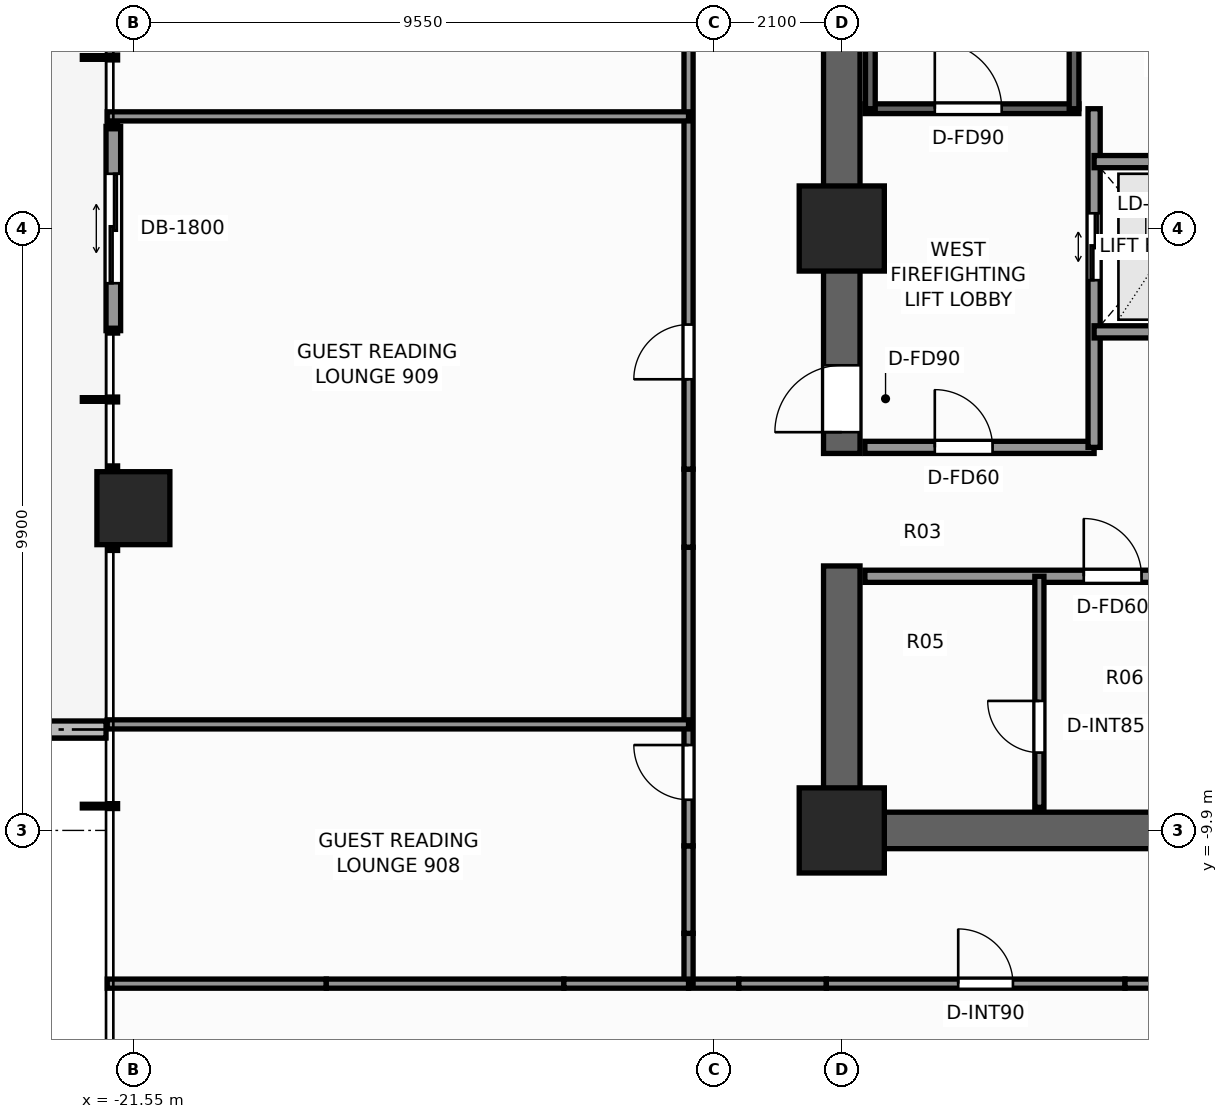
"""IFC4 building model, lengths in metres.
Left out: names, types, materials, properties, quantities, classifications, styles, units other than length and angle.
Written with IfcOpenShell. Run it as: python <this file> out.ifc"""

import sys

from ifc_helpers import new_model, si_unit, direction, frame, frame_2d, origin, origin_2d, place, context, subcontext, project, spatial, rectangle, extrude, element, fill, save


model = new_model("IFC4")
c1 = context("Model", 3, precision=1e-05, world=origin(), true_north=direction((0.0, 1.0)))
c2 = subcontext(c1, "Body", "Model", "MODEL_VIEW")
j1 = project(units=[si_unit("LENGTHUNIT", "METRE"), si_unit("PLANEANGLEUNIT", "RADIAN")], contexts=[c1])
p1 = place(None, origin())
s1 = spatial("IfcSite", under=j1, at=p1, CompositionType="ELEMENT")
p2 = place(p1, origin())
s2 = spatial("IfcBuilding", under=s1, at=p2, CompositionType="ELEMENT")
p3 = place(p2, frame((0.0, 0.0, 33.7)))
s3 = spatial("IfcBuildingStorey", under=s2, at=p3, CompositionType="ELEMENT", Elevation=33.7)
p4 = place(p3, frame((-3.54, -9.9, 0.0), z_axis=(0.0, 0.0, 1.0), x_axis=(-1.0, 0.0, 0.0)))
e1 = element("IfcWall", 1, at=p4, inside=s3, PredefinedType="SHEAR", context=c2, shape_type="SweptSolid", body=[
    extrude(rectangle(XDim=6.66, YDim=0.6, at=frame_2d((3.33, 0.0))), origin(), (0.0, 0.0, 1.0), 3.3),
])
p5 = place(p3, frame((-9.9, -9.6, 0.0), z_axis=(0.0, 0.0, 1.0), x_axis=(0.0, 1.0, 0.0)))
e2 = element("IfcWall", 2, at=p5, inside=s3, PredefinedType="SHEAR", context=c2, shape_type="SweptSolid", body=[
    extrude(rectangle(XDim=4.05, YDim=0.6, at=frame_2d((2.025, 0.0))), origin(), (0.0, 0.0, 1.0), 3.3),
])
p6 = place(p3, frame((-9.9, -3.7, 0.0), z_axis=(0.0, 0.0, 1.0), x_axis=(0.0, 1.0, 0.0)))
e3 = element("IfcWall", 3, at=p6, inside=s3, PredefinedType="SHEAR", context=c2, shape_type="SweptSolid", body=[
    extrude(rectangle(XDim=13.3, YDim=0.6, at=frame_2d((6.65, 0.0))), origin(), (0.0, 0.0, 1.0), 3.3),
])
p7 = place(p6, frame((0.35, 0.0, 0.0)))
e4 = element("IfcOpeningElement", 4, at=p7, cuts=e3, PredefinedType="OPENING", context=c2, shape_type="SweptSolid", body=[
    extrude(rectangle(XDim=1.1, YDim=2.2, at=frame_2d((0.55, 1.1))), frame((0.0, 0.31, 0.0), z_axis=(0.0, -1.0, 0.0), x_axis=(1.0, 0.0, 0.0)), (0.0, 0.0, 1.0), 0.62),
])
for number, where, z_axis, x_axis in (
    (5, (-9.9, -9.9, 0.0), (0.0, 0.0, 1.0), (1.0, 0.0, 0.0)),
    (6, (-9.9, 0.0, 0.0), (0.0, 0.0, 1.0), (1.0, 0.0, 0.0)),
):
    element("IfcColumn", number, at=place(p3, frame(where, z_axis=z_axis, x_axis=x_axis)), inside=s3, PredefinedType="COLUMN", context=c2, shape_type="SweptSolid", body=[
        extrude(rectangle(XDim=1.4, YDim=1.4, at=origin_2d()), origin(), (0.0, 0.0, 1.0), 3.3),
    ])
p8 = place(p3, frame((-21.55, -4.6, 0.0), z_axis=(0.0, 0.0, 1.0), x_axis=(1.0, 0.0, 0.0)))
e7 = element("IfcColumn", 7, at=p8, inside=s3, PredefinedType="COLUMN", context=c2, shape_type="SweptSolid", body=[
    extrude(rectangle(XDim=1.2, YDim=1.2, at=origin_2d()), origin(), (0.0, 0.0, 1.0), 3.3),
])
p9 = place(p3, frame((-24.006, -8.24, -0.06), z_axis=(0.0, 0.0, 1.0), x_axis=(1.0, 0.0, 0.0)))
e8 = element("IfcWall", 8, at=p9, inside=s3, PredefinedType="PARAPET", context=c2, shape_type="SweptSolid", body=[
    extrude(rectangle(XDim=2.006, YDim=0.28, at=frame_2d((1.003, 0.0))), origin(), (0.0, 0.0, 1.0), 0.42),
])
p10 = place(p3, frame((-21.88, -1.68, 0.0), z_axis=(0.0, 0.0, 1.0), x_axis=(0.0, 1.0, 0.0)))
e9 = element("IfcWall", 9, at=p10, inside=s3, PredefinedType="STANDARD", context=c2, shape_type="SweptSolid", body=[
    extrude(rectangle(XDim=3.36, YDim=0.24, at=frame_2d((1.68, 0.0))), origin(), (0.0, 0.0, 1.0), 3.06),
])
p11 = place(p10, frame((0.78, 0.0, 0.0)))
e10 = element("IfcOpeningElement", 10, at=p11, cuts=e9, PredefinedType="OPENING", context=c2, shape_type="SweptSolid", body=[
    extrude(rectangle(XDim=1.8, YDim=2.2, at=frame_2d((0.9, 1.1))), frame((0.0, 0.13, 0.0), z_axis=(0.0, -1.0, 0.0), x_axis=(1.0, 0.0, 0.0)), (0.0, 0.0, 1.0), 0.26),
])
p12 = place(p3, frame((-9.52, 1.97, 0.0), z_axis=(0.0, 0.0, 1.0), x_axis=(1.0, 0.0, 0.0)))
e11 = element("IfcWall", 11, at=p12, inside=s3, PredefinedType="SHEAR", context=c2, shape_type="SweptSolid", body=[
    extrude(rectangle(XDim=3.52, YDim=0.16, at=frame_2d((1.76, 0.0))), origin(), (0.0, 0.0, 1.0), 3.3),
])
p13 = place(p12, frame((1.15, 0.0, 0.0)))
e12 = element("IfcOpeningElement", 12, at=p13, cuts=e11, PredefinedType="OPENING", context=c2, shape_type="SweptSolid", body=[
    extrude(rectangle(XDim=1.1, YDim=2.2, at=frame_2d((0.55, 1.1))), frame((0.0, 0.09, 0.0), z_axis=(0.0, -1.0, 0.0), x_axis=(1.0, 0.0, 0.0)), (0.0, 0.0, 1.0), 0.18),
])
for number, where, z_axis, x_axis in (
    (13, (-9.43, 1.97, 0.0), (0.0, 0.0, 1.0), (0.0, 1.0, 0.0)),
    (14, (-6.08, 1.97, 0.0), (0.0, 0.0, 1.0), (0.0, 1.0, 0.0)),
):
    element("IfcWall", number, at=place(p3, frame(where, z_axis=z_axis, x_axis=x_axis)), inside=s3, PredefinedType="SHEAR", context=c2, shape_type="SweptSolid", body=[
        extrude(rectangle(XDim=7.56, YDim=0.16, at=frame_2d((3.78, 0.0))), origin(), (0.0, 0.0, 1.0), 3.3),
    ])
p14 = place(p3, frame((-9.52, -3.6, 0.0), z_axis=(0.0, 0.0, 1.0), x_axis=(1.0, 0.0, 0.0)))
e15 = element("IfcWall", 15, at=p14, inside=s3, PredefinedType="SOLIDWALL", context=c2, shape_type="SweptSolid", body=[
    extrude(rectangle(XDim=3.77, YDim=0.2, at=frame_2d((1.885, 0.0))), origin(), (0.0, 0.0, 1.0), 3.06),
])
p15 = place(p14, frame((1.15, 0.0, 0.0)))
e16 = element("IfcOpeningElement", 16, at=p15, cuts=e15, PredefinedType="OPENING", context=c2, shape_type="SweptSolid", body=[
    extrude(rectangle(XDim=0.95, YDim=2.06, at=frame_2d((0.475, 1.03))), frame((0.0, 0.11, 0.0), z_axis=(0.0, -1.0, 0.0), x_axis=(1.0, 0.0, 0.0)), (0.0, 0.0, 1.0), 0.22),
])
p16 = place(p3, frame((-5.75, -3.6, 0.0), z_axis=(0.0, 0.0, 1.0), x_axis=(0.0, 1.0, 0.0)))
e17 = element("IfcWall", 17, at=p16, inside=s3, PredefinedType="SOLIDWALL", context=c2, shape_type="SweptSolid", body=[
    extrude(rectangle(XDim=5.57, YDim=0.2, at=frame_2d((2.785, 0.0))), origin(), (0.0, 0.0, 1.0), 3.06),
])
p17 = place(p16, frame((2.75, 0.0, 0.0)))
e18 = element("IfcOpeningElement", 18, at=p17, cuts=e17, PredefinedType="OPENING", context=c2, shape_type="SweptSolid", body=[
    extrude(rectangle(XDim=1.1, YDim=2.2, at=frame_2d((0.55, 1.1))), frame((0.0, 0.11, 0.0), z_axis=(0.0, -1.0, 0.0), x_axis=(1.0, 0.0, 0.0)), (0.0, 0.0, 1.0), 0.22),
])
for number, where, z_axis, x_axis in (
    (19, (-5.75, -1.7, 0.0), (0.0, 0.0, 1.0), (1.0, 0.0, 0.0)),
    (20, (-5.75, 1.1, 0.0), (0.0, 0.0, 1.0), (1.0, 0.0, 0.0)),
):
    element("IfcWall", number, at=place(p3, frame(where, z_axis=z_axis, x_axis=x_axis)), inside=s3, PredefinedType="SOLIDWALL", context=c2, shape_type="SweptSolid", body=[
        extrude(rectangle(XDim=2.4, YDim=0.2, at=frame_2d((1.2, 0.0))), origin(), (0.0, 0.0, 1.0), 3.06),
    ])
p18 = place(p3, frame((-9.52, -5.72, 0.0), z_axis=(0.0, 0.0, 1.0), x_axis=(1.0, 0.0, 0.0)))
e21 = element("IfcWall", 21, at=p18, inside=s3, PredefinedType="SOLIDWALL", context=c2, shape_type="SweptSolid", body=[
    extrude(rectangle(XDim=5.66, YDim=0.2, at=frame_2d((2.83, 0.0))), origin(), (0.0, 0.0, 1.0), 3.06),
])
p19 = place(p18, frame((3.6, 0.0, 0.0)))
e22 = element("IfcOpeningElement", 22, at=p19, cuts=e21, PredefinedType="OPENING", context=c2, shape_type="SweptSolid", body=[
    extrude(rectangle(XDim=0.95, YDim=2.06, at=frame_2d((0.475, 1.03))), frame((0.0, 0.11, 0.0), z_axis=(0.0, -1.0, 0.0), x_axis=(1.0, 0.0, 0.0)), (0.0, 0.0, 1.0), 0.22),
])
p20 = place(p3, frame((-6.65, -9.52, 0.0), z_axis=(0.0, 0.0, 1.0), x_axis=(0.0, 1.0, 0.0)))
e23 = element("IfcWall", 23, at=p20, inside=s3, PredefinedType="PARTITIONING", context=c2, shape_type="SweptSolid", body=[
    extrude(rectangle(XDim=3.8, YDim=0.15, at=frame_2d((1.9, 0.0))), origin(), (0.0, 0.0, 1.0), 3.06),
])
p21 = place(p20, frame((0.9, 0.0, 0.0)))
e24 = element("IfcOpeningElement", 24, at=p21, cuts=e23, PredefinedType="OPENING", context=c2, shape_type="SweptSolid", body=[
    extrude(rectangle(XDim=0.85, YDim=2.03, at=frame_2d((0.425, 1.015))), frame((0.0, 0.085, 0.0), z_axis=(0.0, -1.0, 0.0), x_axis=(1.0, 0.0, 0.0)), (0.0, 0.0, 1.0), 0.17),
])
p22 = place(p3, frame((-12.42, -12.42, 0.0), z_axis=(0.0, 0.0, 1.0), x_axis=(1.0, 0.0, 0.0)))
e25 = element("IfcWall", 25, at=p22, inside=s3, PredefinedType="PARTITIONING", context=c2, shape_type="SweptSolid", body=[
    extrude(rectangle(XDim=0.827, YDim=0.15, at=frame_2d((0.414, 0.0))), origin(), (0.0, 0.0, 1.0), 3.06),
])
p23 = place(p3, frame((-11.593, -12.42, 0.0), z_axis=(0.0, 0.0, 1.0), x_axis=(1.0, 0.0, 0.0)))
e26 = element("IfcWall", 26, at=p23, inside=s3, PredefinedType="PARTITIONING", context=c2, shape_type="SweptSolid", body=[
    extrude(rectangle(XDim=1.439, YDim=0.15, at=frame_2d((0.72, 0.0))), origin(), (0.0, 0.0, 1.0), 1.945),
])
p24 = place(p3, frame((-10.154, -12.42, 0.0), z_axis=(0.0, 0.0, 1.0), x_axis=(1.0, 0.0, 0.0)))
e27 = element("IfcWall", 27, at=p24, inside=s3, PredefinedType="PARTITIONING", context=c2, shape_type="SweptSolid", body=[
    extrude(rectangle(XDim=4.912, YDim=0.15, at=frame_2d((2.456, 0.0))), origin(), (0.0, 0.0, 1.0), 3.06),
])
p25 = place(p24, frame((2.169, 0.0, 0.0)))
e28 = element("IfcOpeningElement", 28, at=p25, cuts=e27, PredefinedType="OPENING", context=c2, shape_type="SweptSolid", body=[
    extrude(rectangle(XDim=0.9, YDim=2.06, at=frame_2d((0.45, 1.03))), frame((0.0, 0.085, 0.0), z_axis=(0.0, -1.0, 0.0), x_axis=(1.0, 0.0, 0.0)), (0.0, 0.0, 1.0), 0.17),
])
p26 = place(p3, frame((-5.242, -12.42, 0.0), z_axis=(0.0, 0.0, 1.0), x_axis=(1.0, 0.0, 0.0)))
e29 = element("IfcWall", 29, at=p26, inside=s3, PredefinedType="PARTITIONING", context=c2, shape_type="SweptSolid", body=[
    extrude(rectangle(XDim=1.284, YDim=0.15, at=frame_2d((0.642, 0.0))), origin(), (0.0, 0.0, 1.0), 1.945),
])
p27 = place(p3, frame((-12.42, -12.42, 0.0), z_axis=(0.0, 0.0, 1.0), x_axis=(0.0, 1.0, 0.0)))
e30 = element("IfcWall", 30, at=p27, inside=s3, PredefinedType="PARTITIONING", context=c2, shape_type="SweptSolid", body=[
    extrude(rectangle(XDim=0.827, YDim=0.15, at=frame_2d((0.414, 0.0))), origin(), (0.0, 0.0, 1.0), 3.06),
])
p28 = place(p3, frame((-12.42, -11.593, 0.0), z_axis=(0.0, 0.0, 1.0), x_axis=(0.0, 1.0, 0.0)))
e31 = element("IfcWall", 31, at=p28, inside=s3, PredefinedType="PARTITIONING", context=c2, shape_type="SweptSolid", body=[
    extrude(rectangle(XDim=1.439, YDim=0.15, at=frame_2d((0.72, 0.0))), origin(), (0.0, 0.0, 1.0), 1.945),
])
p29 = place(p3, frame((-12.42, -10.154, 0.0), z_axis=(0.0, 0.0, 1.0), x_axis=(0.0, 1.0, 0.0)))
e32 = element("IfcWall", 32, at=p29, inside=s3, PredefinedType="PARTITIONING", context=c2, shape_type="SweptSolid", body=[
    extrude(rectangle(XDim=4.912, YDim=0.15, at=frame_2d((2.456, 0.0))), origin(), (0.0, 0.0, 1.0), 3.06),
])
p30 = place(p29, frame((0.758, 0.0, 0.0)))
e33 = element("IfcOpeningElement", 33, at=p30, cuts=e32, PredefinedType="OPENING", context=c2, shape_type="SweptSolid", body=[
    extrude(rectangle(XDim=0.9, YDim=2.06, at=frame_2d((0.45, 1.03))), frame((0.0, 0.085, 0.0), z_axis=(0.0, -1.0, 0.0), x_axis=(1.0, 0.0, 0.0)), (0.0, 0.0, 1.0), 0.17),
])
p31 = place(p3, frame((-12.42, -5.242, 0.0), z_axis=(0.0, 0.0, 1.0), x_axis=(0.0, 1.0, 0.0)))
e34 = element("IfcWall", 34, at=p31, inside=s3, PredefinedType="PARTITIONING", context=c2, shape_type="SweptSolid", body=[
    extrude(rectangle(XDim=1.284, YDim=0.15, at=frame_2d((0.642, 0.0))), origin(), (0.0, 0.0, 1.0), 1.945),
])
p32 = place(p3, frame((-12.42, -3.958, 0.0), z_axis=(0.0, 0.0, 1.0), x_axis=(0.0, 1.0, 0.0)))
e35 = element("IfcWall", 35, at=p32, inside=s3, PredefinedType="PARTITIONING", context=c2, shape_type="SweptSolid", body=[
    extrude(rectangle(XDim=7.916, YDim=0.15, at=frame_2d((3.958, 0.0))), origin(), (0.0, 0.0, 1.0), 2.585),
])
p33 = place(p32, frame((1.478, 0.0, 0.0)))
e36 = element("IfcOpeningElement", 36, at=p33, cuts=e35, PredefinedType="OPENING", context=c2, shape_type="SweptSolid", body=[
    extrude(rectangle(XDim=0.9, YDim=2.06, at=frame_2d((0.45, 1.03))), frame((0.0, 0.085, 0.0), z_axis=(0.0, -1.0, 0.0), x_axis=(1.0, 0.0, 0.0)), (0.0, 0.0, 1.0), 0.17),
])
p34 = place(p3, frame((-21.98, -12.42, 0.0), z_axis=(0.0, 0.0, 1.0), x_axis=(1.0, 0.0, 0.0)))
e37 = element("IfcWall", 37, at=p34, inside=s3, PredefinedType="PARTITIONING", context=c2, shape_type="SweptSolid", body=[
    extrude(rectangle(XDim=3.602, YDim=0.15, at=frame_2d((1.801, 0.0))), origin(), (0.0, 0.0, 1.0), 2.429),
])
p35 = place(p3, frame((-18.378, -12.42, 0.0), z_axis=(0.0, 0.0, 1.0), x_axis=(1.0, 0.0, 0.0)))
e38 = element("IfcWall", 38, at=p35, inside=s3, PredefinedType="PARTITIONING", context=c2, shape_type="SweptSolid", body=[
    extrude(rectangle(XDim=3.907, YDim=0.15, at=frame_2d((1.954, 0.0))), origin(), (0.0, 0.0, 1.0), 1.945),
])
p36 = place(p3, frame((-14.47, -12.42, 0.0), z_axis=(0.0, 0.0, 1.0), x_axis=(1.0, 0.0, 0.0)))
e39 = element("IfcWall", 39, at=p36, inside=s3, PredefinedType="PARTITIONING", context=c2, shape_type="SweptSolid", body=[
    extrude(rectangle(XDim=2.05, YDim=0.15, at=frame_2d((1.025, 0.0))), origin(), (0.0, 0.0, 1.0), 3.06),
])
for number, where, z_axis, x_axis in (
    (40, (-21.98, -8.156, 0.0), (0.0, 0.0, 1.0), (1.0, 0.0, 0.0)),
    (41, (-21.98, 1.844, 0.0), (0.0, 0.0, 1.0), (1.0, 0.0, 0.0)),
):
    element("IfcWall", number, at=place(p3, frame(where, z_axis=z_axis, x_axis=x_axis)), inside=s3, PredefinedType="PARTITIONING", context=c2, shape_type="SweptSolid", body=[
        extrude(rectangle(XDim=9.56, YDim=0.15, at=frame_2d((4.78, 0.0))), origin(), (0.0, 0.0, 1.0), 2.429),
    ])
p37 = place(p11, origin())
e42 = element("IfcDoor", 42, at=p37, inside=s3, OperationType="DOUBLE_DOOR_SLIDING", PredefinedType="DOOR", context=c2, shape_type="SweptSolid", body=[
    extrude(rectangle(XDim=1.8, YDim=2.2, at=frame_2d((0.9, 1.1))), frame((0.0, 0.025, 0.0), z_axis=(0.0, -1.0, 0.0), x_axis=(1.0, 0.0, 0.0)), (0.0, 0.0, 1.0), 0.05),
])
fill(e10, e42)
p38 = place(p13, origin())
e43 = element("IfcDoor", 43, at=p38, inside=s3, OperationType="SINGLE_SWING_LEFT", PredefinedType="DOOR", context=c2, shape_type="SweptSolid", body=[
    extrude(rectangle(XDim=1.1, YDim=2.2, at=frame_2d((0.55, 1.1))), frame((0.0, 0.025, 0.0), z_axis=(0.0, -1.0, 0.0), x_axis=(1.0, 0.0, 0.0)), (0.0, 0.0, 1.0), 0.05),
])
fill(e12, e43)
p39 = place(p7, origin())
e44 = element("IfcDoor", 44, at=p39, inside=s3, OperationType="SINGLE_SWING_LEFT", PredefinedType="DOOR", context=c2, shape_type="SweptSolid", body=[
    extrude(rectangle(XDim=1.1, YDim=2.2, at=frame_2d((0.55, 1.1))), frame((0.0, 0.025, 0.0), z_axis=(0.0, -1.0, 0.0), x_axis=(1.0, 0.0, 0.0)), (0.0, 0.0, 1.0), 0.05),
])
fill(e4, e44)
p40 = place(p17, origin())
e45 = element("IfcDoor", 45, at=p40, inside=s3, OperationType="DOUBLE_DOOR_SLIDING", PredefinedType="DOOR", context=c2, shape_type="SweptSolid", body=[
    extrude(rectangle(XDim=1.1, YDim=2.2, at=frame_2d((0.55, 1.1))), frame((0.0, 0.025, 0.0), z_axis=(0.0, -1.0, 0.0), x_axis=(1.0, 0.0, 0.0)), (0.0, 0.0, 1.0), 0.05),
])
fill(e18, e45)
p41 = place(p19, origin())
e46 = element("IfcDoor", 46, at=p41, inside=s3, OperationType="SINGLE_SWING_LEFT", PredefinedType="DOOR", context=c2, shape_type="SweptSolid", body=[
    extrude(rectangle(XDim=0.95, YDim=2.06, at=frame_2d((0.475, 1.03))), frame((0.0, 0.025, 0.0), z_axis=(0.0, -1.0, 0.0), x_axis=(1.0, 0.0, 0.0)), (0.0, 0.0, 1.0), 0.05),
])
fill(e22, e46)
p42 = place(p21, origin())
e47 = element("IfcDoor", 47, at=p42, inside=s3, OperationType="SINGLE_SWING_RIGHT", PredefinedType="DOOR", context=c2, shape_type="SweptSolid", body=[
    extrude(rectangle(XDim=0.85, YDim=2.03, at=frame_2d((0.425, 1.015))), frame((0.0, 0.025, 0.0), z_axis=(0.0, -1.0, 0.0), x_axis=(1.0, 0.0, 0.0)), (0.0, 0.0, 1.0), 0.05),
])
fill(e24, e47)
p43 = place(p15, origin())
e48 = element("IfcDoor", 48, at=p43, inside=s3, OperationType="SINGLE_SWING_LEFT", PredefinedType="DOOR", context=c2, shape_type="SweptSolid", body=[
    extrude(rectangle(XDim=0.95, YDim=2.06, at=frame_2d((0.475, 1.03))), frame((0.0, 0.025, 0.0), z_axis=(0.0, -1.0, 0.0), x_axis=(1.0, 0.0, 0.0)), (0.0, 0.0, 1.0), 0.05),
])
fill(e16, e48)
p44 = place(p25, origin())
e49 = element("IfcDoor", 49, at=p44, inside=s3, OperationType="SINGLE_SWING_LEFT", PredefinedType="DOOR", context=c2, shape_type="SweptSolid", body=[
    extrude(rectangle(XDim=0.9, YDim=2.06, at=frame_2d((0.45, 1.03))), frame((0.0, 0.025, 0.0), z_axis=(0.0, -1.0, 0.0), x_axis=(1.0, 0.0, 0.0)), (0.0, 0.0, 1.0), 0.05),
])
fill(e28, e49)
p45 = place(p30, origin())
e50 = element("IfcDoor", 50, at=p45, inside=s3, OperationType="SINGLE_SWING_RIGHT", PredefinedType="DOOR", context=c2, shape_type="SweptSolid", body=[
    extrude(rectangle(XDim=0.9, YDim=2.06, at=frame_2d((0.45, 1.03))), frame((0.0, 0.025, 0.0), z_axis=(0.0, -1.0, 0.0), x_axis=(1.0, 0.0, 0.0)), (0.0, 0.0, 1.0), 0.05),
])
fill(e33, e50)
p46 = place(p33, origin())
e51 = element("IfcDoor", 51, at=p46, inside=s3, OperationType="SINGLE_SWING_LEFT", PredefinedType="DOOR", context=c2, shape_type="SweptSolid", body=[
    extrude(rectangle(XDim=0.9, YDim=2.06, at=frame_2d((0.45, 1.03))), frame((0.0, 0.025, 0.0), z_axis=(0.0, -1.0, 0.0), x_axis=(1.0, 0.0, 0.0)), (0.0, 0.0, 1.0), 0.05),
])
fill(e36, e51)
save(model, sys.argv[1])
